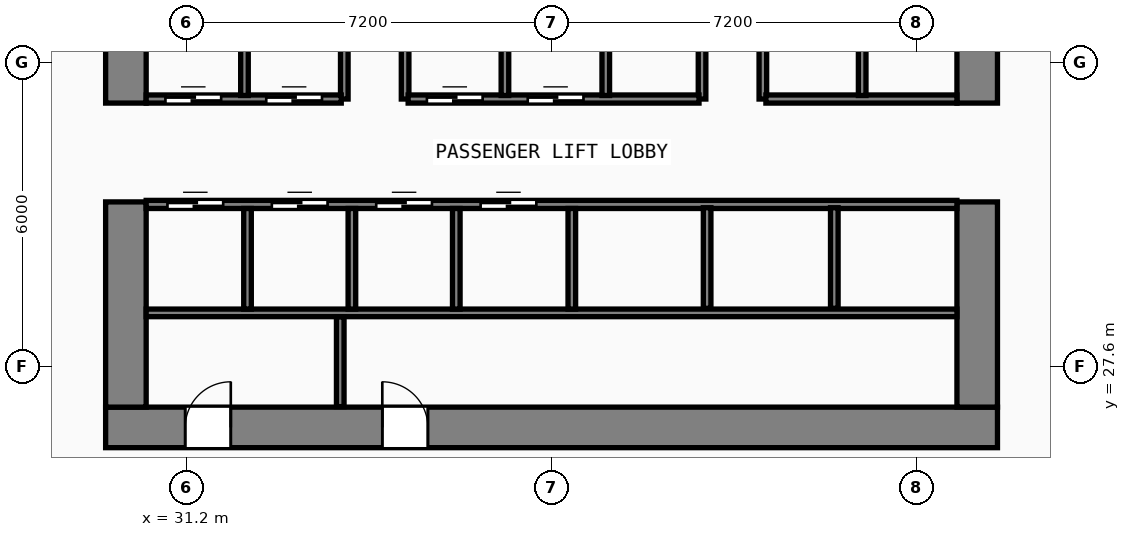
"""IFC4 building model, lengths in metres.
Left out: names, types, materials, properties, quantities, classifications, styles, units other than length and angle.
Written with IfcOpenShell. Run it as: python <this file> out.ifc"""

import sys

from ifc_helpers import new_model, si_unit, direction, frame, frame_2d, origin, place, context, subcontext, project, spatial, rectangle, extrude, element, fill, save


model = new_model("IFC4")
c1 = context("Model", 3, precision=1e-05, world=origin(), true_north=direction((0.0, 1.0)))
c2 = subcontext(c1, "Body", "Model", "MODEL_VIEW")
j1 = project(units=[si_unit("LENGTHUNIT", "METRE"), si_unit("PLANEANGLEUNIT", "RADIAN")], contexts=[c1])
p1 = place(None, origin())
s1 = spatial("IfcSite", under=j1, at=p1, CompositionType="ELEMENT")
p2 = place(p1, origin())
s2 = spatial("IfcBuilding", under=s1, at=p2, CompositionType="ELEMENT")
p3 = place(p2, frame((0.0, 0.0, 19.8)))
s3 = spatial("IfcBuildingStorey", under=s2, at=p3, CompositionType="ELEMENT", Elevation=19.8)
p4 = place(p3, frame((29.6, 26.4, 0.0), z_axis=(0.0, 0.0, 1.0), x_axis=(1.0, 0.0, 0.0)))
e1 = element("IfcWall", 1, at=p4, inside=s3, PredefinedType="SHEAR", context=c2, shape_type="SweptSolid", body=[
    extrude(rectangle(XDim=17.6, YDim=0.8, at=frame_2d((8.8, 0.0))), origin(), (0.0, 0.0, 1.0), 4.0),
])
p5 = place(p4, frame((2.47, 0.0, 0.0), z_axis=(0.0, 0.0, 1.0), x_axis=(-1.0, 0.0, 0.0)))
e2 = element("IfcOpeningElement", 2, at=p5, cuts=e1, PredefinedType="OPENING", context=c2, shape_type="SweptSolid", body=[
    extrude(rectangle(XDim=0.9, YDim=2.1, at=frame_2d((0.45, 1.05))), frame((0.0, 0.41, 0.0), z_axis=(0.0, -1.0, 0.0), x_axis=(1.0, 0.0, 0.0)), (0.0, 0.0, 1.0), 0.82),
])
p6 = place(p4, frame((6.36, 0.0, 0.0), z_axis=(0.0, 0.0, 1.0), x_axis=(-1.0, 0.0, 0.0)))
e3 = element("IfcOpeningElement", 3, at=p6, cuts=e1, PredefinedType="OPENING", context=c2, shape_type="SweptSolid", body=[
    extrude(rectangle(XDim=0.9, YDim=2.1, at=frame_2d((0.45, 1.05))), frame((0.0, 0.41, 0.0), z_axis=(0.0, -1.0, 0.0), x_axis=(1.0, 0.0, 0.0)), (0.0, 0.0, 1.0), 0.82),
])
p7 = place(p3, frame((30.0, 26.8, 0.0), z_axis=(0.0, 0.0, 1.0), x_axis=(0.0, 1.0, 0.0)))
e4 = element("IfcWall", 4, at=p7, inside=s3, PredefinedType="SHEAR", context=c2, shape_type="SweptSolid", body=[
    extrude(rectangle(XDim=4.05, YDim=0.8, at=frame_2d((2.025, 0.0))), origin(), (0.0, 0.0, 1.0), 4.0),
])
p8 = place(p3, frame((30.0, 32.8, 0.0), z_axis=(0.0, 0.0, 1.0), x_axis=(0.0, 1.0, 0.0)))
e5 = element("IfcWall", 5, at=p8, inside=s3, PredefinedType="SHEAR", context=c2, shape_type="SweptSolid", body=[
    extrude(rectangle(XDim=10.0, YDim=0.8, at=frame_2d((5.0, 0.0))), origin(), (0.0, 0.0, 1.0), 4.0),
])
p9 = place(p3, frame((46.8, 26.8, 0.0), z_axis=(0.0, 0.0, 1.0), x_axis=(0.0, 1.0, 0.0)))
e6 = element("IfcWall", 6, at=p9, inside=s3, PredefinedType="SHEAR", context=c2, shape_type="SweptSolid", body=[
    extrude(rectangle(XDim=4.05, YDim=0.8, at=frame_2d((2.025, 0.0))), origin(), (0.0, 0.0, 1.0), 4.0),
])
p10 = place(p3, frame((46.8, 32.8, 0.0), z_axis=(0.0, 0.0, 1.0), x_axis=(0.0, 1.0, 0.0)))
e7 = element("IfcWall", 7, at=p10, inside=s3, PredefinedType="SHEAR", context=c2, shape_type="SweptSolid", body=[
    extrude(rectangle(XDim=10.0, YDim=0.8, at=frame_2d((5.0, 0.0))), origin(), (0.0, 0.0, 1.0), 4.0),
])
for number, where, z_axis, x_axis in (
    (8, (34.31, 32.88, 0.0), (0.0, 0.0, 1.0), (0.0, 1.0, 0.0)),
    (9, (35.51, 32.88, 0.0), (0.0, 0.0, 1.0), (0.0, 1.0, 0.0)),
    (10, (41.37, 32.88, 0.0), (0.0, 0.0, 1.0), (0.0, 1.0, 0.0)),
    (11, (42.57, 32.88, 0.0), (0.0, 0.0, 1.0), (0.0, 1.0, 0.0)),
):
    element("IfcWall", number, at=place(p3, frame(where, z_axis=z_axis, x_axis=x_axis)), inside=s3, PredefinedType="SOLIDWALL", context=c2, shape_type="SweptSolid", body=[
        extrude(rectangle(XDim=2.17, YDim=0.15, at=frame_2d((1.085, 0.0))), origin(), (0.0, 0.0, 1.0), 4.0),
    ])
p11 = place(p3, frame((30.4, 32.88, 0.0), z_axis=(0.0, 0.0, 1.0), x_axis=(1.0, 0.0, 0.0)))
e12 = element("IfcWall", 12, at=p11, inside=s3, PredefinedType="SOLIDWALL", context=c2, shape_type="SweptSolid", body=[
    extrude(rectangle(XDim=3.85, YDim=0.16, at=frame_2d((1.925, 0.0))), origin(), (0.0, 0.0, 1.0), 4.0),
])
p12 = place(p11, frame((1.48, 0.0, 0.0), z_axis=(0.0, 0.0, 1.0), x_axis=(-1.0, 0.0, 0.0)))
e13 = element("IfcOpeningElement", 13, at=p12, cuts=e12, PredefinedType="OPENING", context=c2, shape_type="SweptSolid", body=[
    extrude(rectangle(XDim=1.1, YDim=2.2, at=frame_2d((0.55, 1.1))), frame((0.0, 0.09, 0.0), z_axis=(0.0, -1.0, 0.0), x_axis=(1.0, 0.0, 0.0)), (0.0, 0.0, 1.0), 0.18),
])
p13 = place(p11, frame((3.47, 0.0, 0.0), z_axis=(0.0, 0.0, 1.0), x_axis=(-1.0, 0.0, 0.0)))
e14 = element("IfcOpeningElement", 14, at=p13, cuts=e12, PredefinedType="OPENING", context=c2, shape_type="SweptSolid", body=[
    extrude(rectangle(XDim=1.1, YDim=2.2, at=frame_2d((0.55, 1.1))), frame((0.0, 0.09, 0.0), z_axis=(0.0, -1.0, 0.0), x_axis=(1.0, 0.0, 0.0)), (0.0, 0.0, 1.0), 0.18),
])
p14 = place(p3, frame((35.57, 32.88, 0.0), z_axis=(0.0, 0.0, 1.0), x_axis=(1.0, 0.0, 0.0)))
e15 = element("IfcWall", 15, at=p14, inside=s3, PredefinedType="SOLIDWALL", context=c2, shape_type="SweptSolid", body=[
    extrude(rectangle(XDim=5.74, YDim=0.16, at=frame_2d((2.87, 0.0))), origin(), (0.0, 0.0, 1.0), 4.0),
])
p15 = place(p14, frame((1.47, 0.0, 0.0), z_axis=(0.0, 0.0, 1.0), x_axis=(-1.0, 0.0, 0.0)))
e16 = element("IfcOpeningElement", 16, at=p15, cuts=e15, PredefinedType="OPENING", context=c2, shape_type="SweptSolid", body=[
    extrude(rectangle(XDim=1.1, YDim=2.2, at=frame_2d((0.55, 1.1))), frame((0.0, 0.09, 0.0), z_axis=(0.0, -1.0, 0.0), x_axis=(1.0, 0.0, 0.0)), (0.0, 0.0, 1.0), 0.18),
])
p16 = place(p14, frame((3.46, 0.0, 0.0), z_axis=(0.0, 0.0, 1.0), x_axis=(-1.0, 0.0, 0.0)))
e17 = element("IfcOpeningElement", 17, at=p16, cuts=e15, PredefinedType="OPENING", context=c2, shape_type="SweptSolid", body=[
    extrude(rectangle(XDim=1.1, YDim=2.2, at=frame_2d((0.55, 1.1))), frame((0.0, 0.09, 0.0), z_axis=(0.0, -1.0, 0.0), x_axis=(1.0, 0.0, 0.0)), (0.0, 0.0, 1.0), 0.18),
])
p17 = place(p3, frame((42.63, 32.88, 0.0), z_axis=(0.0, 0.0, 1.0), x_axis=(1.0, 0.0, 0.0)))
e18 = element("IfcWall", 18, at=p17, inside=s3, PredefinedType="SOLIDWALL", context=c2, shape_type="SweptSolid", body=[
    extrude(rectangle(XDim=3.77, YDim=0.16, at=frame_2d((1.885, 0.0))), origin(), (0.0, 0.0, 1.0), 4.0),
])
for number, where, z_axis, x_axis in (
    (19, (32.34, 32.95, 0.0), (0.0, 0.0, 1.0), (0.0, 1.0, 0.0)),
    (20, (37.48, 32.95, 0.0), (0.0, 0.0, 1.0), (0.0, 1.0, 0.0)),
    (21, (39.47, 32.95, 0.0), (0.0, 0.0, 1.0), (0.0, 1.0, 0.0)),
    (22, (44.53, 32.95, 0.0), (0.0, 0.0, 1.0), (0.0, 1.0, 0.0)),
):
    element("IfcWall", number, at=place(p3, frame(where, z_axis=z_axis, x_axis=x_axis)), inside=s3, PredefinedType="SOLIDWALL", context=c2, shape_type="SweptSolid", body=[
        extrude(rectangle(XDim=2.05, YDim=0.15, at=frame_2d((1.025, 0.0))), origin(), (0.0, 0.0, 1.0), 4.0),
    ])
p18 = place(p3, frame((30.4, 30.8, 0.0), z_axis=(0.0, 0.0, 1.0), x_axis=(1.0, 0.0, 0.0)))
e23 = element("IfcWall", 23, at=p18, inside=s3, PredefinedType="SOLIDWALL", context=c2, shape_type="SweptSolid", body=[
    extrude(rectangle(XDim=16.0, YDim=0.16, at=frame_2d((8.0, 0.0))), origin(), (0.0, 0.0, 1.0), 4.0),
])
p19 = place(p18, frame((0.42, 0.0, 0.0)))
e24 = element("IfcOpeningElement", 24, at=p19, cuts=e23, PredefinedType="OPENING", context=c2, shape_type="SweptSolid", body=[
    extrude(rectangle(XDim=1.1, YDim=2.2, at=frame_2d((0.55, 1.1))), frame((0.0, 0.09, 0.0), z_axis=(0.0, -1.0, 0.0), x_axis=(1.0, 0.0, 0.0)), (0.0, 0.0, 1.0), 0.18),
])
p20 = place(p18, frame((2.48, 0.0, 0.0)))
e25 = element("IfcOpeningElement", 25, at=p20, cuts=e23, PredefinedType="OPENING", context=c2, shape_type="SweptSolid", body=[
    extrude(rectangle(XDim=1.1, YDim=2.2, at=frame_2d((0.55, 1.1))), frame((0.0, 0.09, 0.0), z_axis=(0.0, -1.0, 0.0), x_axis=(1.0, 0.0, 0.0)), (0.0, 0.0, 1.0), 0.18),
])
p21 = place(p18, frame((4.54, 0.0, 0.0)))
e26 = element("IfcOpeningElement", 26, at=p21, cuts=e23, PredefinedType="OPENING", context=c2, shape_type="SweptSolid", body=[
    extrude(rectangle(XDim=1.1, YDim=2.2, at=frame_2d((0.55, 1.1))), frame((0.0, 0.09, 0.0), z_axis=(0.0, -1.0, 0.0), x_axis=(1.0, 0.0, 0.0)), (0.0, 0.0, 1.0), 0.18),
])
p22 = place(p18, frame((6.6, 0.0, 0.0)))
e27 = element("IfcOpeningElement", 27, at=p22, cuts=e23, PredefinedType="OPENING", context=c2, shape_type="SweptSolid", body=[
    extrude(rectangle(XDim=1.1, YDim=2.2, at=frame_2d((0.55, 1.1))), frame((0.0, 0.09, 0.0), z_axis=(0.0, -1.0, 0.0), x_axis=(1.0, 0.0, 0.0)), (0.0, 0.0, 1.0), 0.18),
])
p23 = place(p3, frame((30.4, 28.66, 0.0), z_axis=(0.0, 0.0, 1.0), x_axis=(1.0, 0.0, 0.0)))
e28 = element("IfcWall", 28, at=p23, inside=s3, PredefinedType="PARTITIONING", context=c2, shape_type="SweptSolid", body=[
    extrude(rectangle(XDim=16.0, YDim=0.15, at=frame_2d((8.0, 0.0))), origin(), (0.0, 0.0, 1.0), 4.0),
])
for number, where, z_axis, x_axis in (
    (29, (32.4, 28.735, 0.0), (0.0, 0.0, 1.0), (0.0, 1.0, 0.0)),
    (30, (34.46, 28.735, 0.0), (0.0, 0.0, 1.0), (0.0, 1.0, 0.0)),
    (31, (36.52, 28.735, 0.0), (0.0, 0.0, 1.0), (0.0, 1.0, 0.0)),
    (32, (38.8, 28.735, 0.0), (0.0, 0.0, 1.0), (0.0, 1.0, 0.0)),
):
    element("IfcWall", number, at=place(p3, frame(where, z_axis=z_axis, x_axis=x_axis)), inside=s3, PredefinedType="SOLIDWALL", context=c2, shape_type="SweptSolid", body=[
        extrude(rectangle(XDim=1.985, YDim=0.15, at=frame_2d((0.992, 0.0))), origin(), (0.0, 0.0, 1.0), 4.0),
    ])
p24 = place(p3, frame((34.23, 26.81, 0.0), z_axis=(0.0, 0.0, 1.0), x_axis=(0.0, 1.0, 0.0)))
e33 = element("IfcWall", 33, at=p24, inside=s3, PredefinedType="PARTITIONING", context=c2, shape_type="SweptSolid", body=[
    extrude(rectangle(XDim=1.77, YDim=0.15, at=frame_2d((0.885, 0.0))), origin(), (0.0, 0.0, 1.0), 4.0),
])
for number, where, z_axis, x_axis in (
    (34, (41.47, 28.75, 0.0), (0.0, 0.0, 1.0), (0.0, 1.0, 0.0)),
    (35, (43.98, 28.75, 0.0), (0.0, 0.0, 1.0), (0.0, 1.0, 0.0)),
):
    element("IfcWall", number, at=place(p3, frame(where, z_axis=z_axis, x_axis=x_axis)), inside=s3, PredefinedType="SOLIDWALL", context=c2, shape_type="SweptSolid", body=[
        extrude(rectangle(XDim=1.985, YDim=0.15, at=frame_2d((0.993, 0.0))), origin(), (0.0, 0.0, 1.0), 4.0),
    ])
p25 = place(p12, origin())
e36 = element("IfcDoor", 36, at=p25, inside=s3, OperationType="SLIDING_TO_LEFT", PredefinedType="DOOR", context=c2, shape_type="SweptSolid", body=[
    extrude(rectangle(XDim=1.1, YDim=2.2, at=frame_2d((0.55, 1.1))), frame((0.0, 0.025, 0.0), z_axis=(0.0, -1.0, 0.0), x_axis=(1.0, 0.0, 0.0)), (0.0, 0.0, 1.0), 0.05),
])
fill(e13, e36)
p26 = place(p13, origin())
e37 = element("IfcDoor", 37, at=p26, inside=s3, OperationType="SLIDING_TO_LEFT", PredefinedType="DOOR", context=c2, shape_type="SweptSolid", body=[
    extrude(rectangle(XDim=1.1, YDim=2.2, at=frame_2d((0.55, 1.1))), frame((0.0, 0.025, 0.0), z_axis=(0.0, -1.0, 0.0), x_axis=(1.0, 0.0, 0.0)), (0.0, 0.0, 1.0), 0.05),
])
fill(e14, e37)
p27 = place(p15, origin())
e38 = element("IfcDoor", 38, at=p27, inside=s3, OperationType="SLIDING_TO_LEFT", PredefinedType="DOOR", context=c2, shape_type="SweptSolid", body=[
    extrude(rectangle(XDim=1.1, YDim=2.2, at=frame_2d((0.55, 1.1))), frame((0.0, 0.025, 0.0), z_axis=(0.0, -1.0, 0.0), x_axis=(1.0, 0.0, 0.0)), (0.0, 0.0, 1.0), 0.05),
])
fill(e16, e38)
p28 = place(p16, origin())
e39 = element("IfcDoor", 39, at=p28, inside=s3, OperationType="SLIDING_TO_LEFT", PredefinedType="DOOR", context=c2, shape_type="SweptSolid", body=[
    extrude(rectangle(XDim=1.1, YDim=2.2, at=frame_2d((0.55, 1.1))), frame((0.0, 0.025, 0.0), z_axis=(0.0, -1.0, 0.0), x_axis=(1.0, 0.0, 0.0)), (0.0, 0.0, 1.0), 0.05),
])
fill(e17, e39)
p29 = place(p19, origin())
e40 = element("IfcDoor", 40, at=p29, inside=s3, OperationType="SLIDING_TO_LEFT", PredefinedType="DOOR", context=c2, shape_type="SweptSolid", body=[
    extrude(rectangle(XDim=1.1, YDim=2.2, at=frame_2d((0.55, 1.1))), frame((0.0, 0.025, 0.0), z_axis=(0.0, -1.0, 0.0), x_axis=(1.0, 0.0, 0.0)), (0.0, 0.0, 1.0), 0.05),
])
fill(e24, e40)
p30 = place(p20, origin())
e41 = element("IfcDoor", 41, at=p30, inside=s3, OperationType="SLIDING_TO_LEFT", PredefinedType="DOOR", context=c2, shape_type="SweptSolid", body=[
    extrude(rectangle(XDim=1.1, YDim=2.2, at=frame_2d((0.55, 1.1))), frame((0.0, 0.025, 0.0), z_axis=(0.0, -1.0, 0.0), x_axis=(1.0, 0.0, 0.0)), (0.0, 0.0, 1.0), 0.05),
])
fill(e25, e41)
p31 = place(p21, origin())
e42 = element("IfcDoor", 42, at=p31, inside=s3, OperationType="SLIDING_TO_LEFT", PredefinedType="DOOR", context=c2, shape_type="SweptSolid", body=[
    extrude(rectangle(XDim=1.1, YDim=2.2, at=frame_2d((0.55, 1.1))), frame((0.0, 0.025, 0.0), z_axis=(0.0, -1.0, 0.0), x_axis=(1.0, 0.0, 0.0)), (0.0, 0.0, 1.0), 0.05),
])
fill(e26, e42)
p32 = place(p22, origin())
e43 = element("IfcDoor", 43, at=p32, inside=s3, OperationType="SLIDING_TO_LEFT", PredefinedType="DOOR", context=c2, shape_type="SweptSolid", body=[
    extrude(rectangle(XDim=1.1, YDim=2.2, at=frame_2d((0.55, 1.1))), frame((0.0, 0.025, 0.0), z_axis=(0.0, -1.0, 0.0), x_axis=(1.0, 0.0, 0.0)), (0.0, 0.0, 1.0), 0.05),
])
fill(e27, e43)
p33 = place(p5, origin())
e44 = element("IfcDoor", 44, at=p33, inside=s3, OperationType="SINGLE_SWING_LEFT", PredefinedType="DOOR", context=c2, shape_type="SweptSolid", body=[
    extrude(rectangle(XDim=0.9, YDim=2.1, at=frame_2d((0.45, 1.05))), frame((0.0, -0.195, 0.0), z_axis=(0.0, -1.0, 0.0), x_axis=(1.0, 0.0, 0.0)), (0.0, 0.0, 1.0), 0.05),
])
fill(e2, e44)
p34 = place(p6, origin())
e45 = element("IfcDoor", 45, at=p34, inside=s3, OperationType="SINGLE_SWING_RIGHT", PredefinedType="DOOR", context=c2, shape_type="SweptSolid", body=[
    extrude(rectangle(XDim=0.9, YDim=2.1, at=frame_2d((0.45, 1.05))), frame((0.0, -0.195, 0.0), z_axis=(0.0, -1.0, 0.0), x_axis=(1.0, 0.0, 0.0)), (0.0, 0.0, 1.0), 0.05),
])
fill(e3, e45)
save(model, sys.argv[1])
